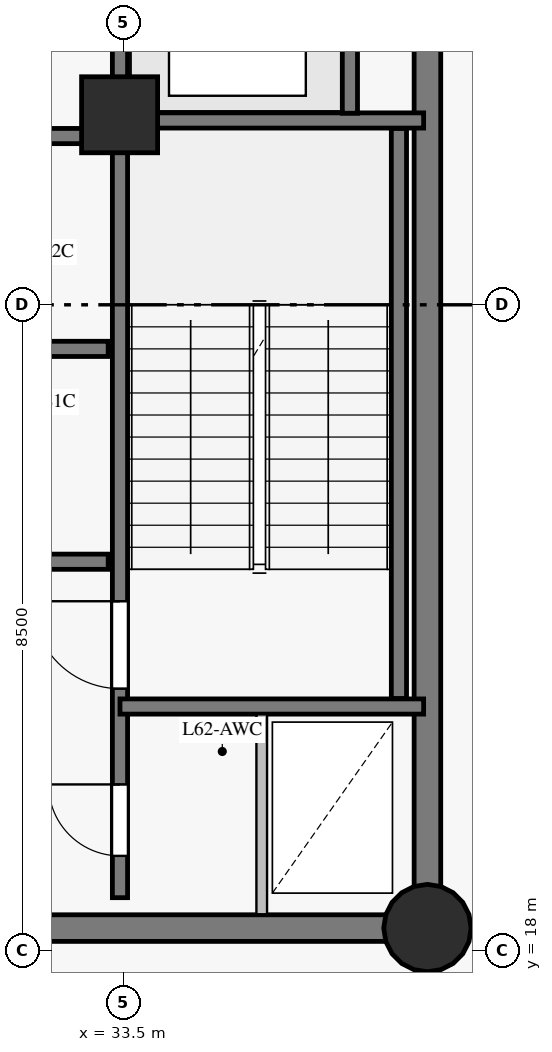
"""IFC4 building model, lengths in metres.
Left out: names, types, materials, properties, quantities, classifications, styles, units other than length and angle.
Written with IfcOpenShell. Run it as: python <this file> out.ifc"""

import sys

from ifc_helpers import new_model, si_unit, direction, frame, frame_2d, origin, origin_with_axes, origin_2d, place, context, subcontext, project, spatial, rectangle, circle, extrude, source, transform, mapped, element, fill, save


model = new_model("IFC4")
c1 = context("Model", 3, precision=1e-05, world=origin(), true_north=direction((0.0, 1.0)))
c2 = subcontext(c1, "Body", "Model", "MODEL_VIEW")
j1 = project(units=[si_unit("LENGTHUNIT", "METRE"), si_unit("PLANEANGLEUNIT", "RADIAN")], contexts=[c1])
p1 = place(None, origin())
s1 = spatial("IfcSite", under=j1, at=p1, CompositionType="ELEMENT")
p2 = place(p1, origin())
s2 = spatial("IfcBuilding", under=s1, at=p2, CompositionType="ELEMENT")
p3 = place(p2, frame((0.0, 0.0, 212.9)))
s3 = spatial("IfcBuildingStorey", under=s2, at=p3, CompositionType="ELEMENT", Elevation=212.9)
p4 = place(p3, frame((26.55, 18.3, 0.0), z_axis=(0.0, 0.0, 1.0), x_axis=(1.0, 0.0, 0.0)))
e1 = element("IfcWall", 1, at=p4, inside=s3, PredefinedType="SHEAR", context=c2, shape_type="SweptSolid", body=[
    extrude(rectangle(XDim=10.95, YDim=0.35, at=frame_2d((5.475, 0.0))), origin(), (0.0, 0.0, 1.0), 3.8),
])
p5 = place(p4, frame((4.55, 0.0, 0.0)))
e2 = element("IfcOpeningElement", 2, at=p5, cuts=e1, PredefinedType="OPENING", context=c2, shape_type="SweptSolid", body=[
    extrude(rectangle(XDim=1.4, YDim=2.2, at=frame_2d((0.7, 1.1))), frame((0.0, 0.185, 0.0), z_axis=(0.0, -1.0, 0.0), x_axis=(1.0, 0.0, 0.0)), (0.0, 0.0, 1.0), 0.37),
])
p6 = place(p3, frame((37.5, 18.3, 0.0), z_axis=(0.0, 0.0, 1.0), x_axis=(0.0, 1.0, 0.0)))
e3 = element("IfcWall", 3, at=p6, inside=s3, PredefinedType="SHEAR", context=c2, shape_type="SweptSolid", body=[
    extrude(rectangle(XDim=16.4, YDim=0.35, at=frame_2d((8.2, 0.0))), origin(), (0.0, 0.0, 1.0), 3.8),
])
p7 = place(p6, frame((13.85, 0.0, 0.0)))
e4 = element("IfcOpeningElement", 4, at=p7, cuts=e3, PredefinedType="OPENING", context=c2, shape_type="SweptSolid", body=[
    extrude(rectangle(XDim=1.2, YDim=2.15, at=frame_2d((0.6, 1.075))), frame((0.0, 0.185, 0.0), z_axis=(0.0, -1.0, 0.0), x_axis=(1.0, 0.0, 0.0)), (0.0, 0.0, 1.0), 0.37),
])
m1 = source(origin_with_axes(), c2, "Body", "SweptSolid", [
    extrude(circle(Radius=0.575, at=origin_2d()), origin(), (0.0, 0.0, 1.0), 4.0),
])
p8 = place(p3, frame((37.5, 18.3, 0.0), z_axis=(0.0, 0.0, 1.0), x_axis=(1.0, 0.0, 0.0)))
e5 = element("IfcColumn", 5, at=p8, inside=s3, PredefinedType="COLUMN", context=c2, shape_type="MappedRepresentation", body=[
    mapped(m1, transform((0.0, 0.0, 0.0), scale=1.0)),
])
m2 = source(origin_with_axes(), c2, "Body", "SweptSolid", [
    extrude(rectangle(XDim=1.0, YDim=1.0, at=origin_2d()), origin(), (0.0, 0.0, 1.0), 4.0),
])
p9 = place(p3, frame((33.45, 29.0, 0.0), z_axis=(0.0, 0.0, 1.0), x_axis=(1.0, 0.0, 0.0)))
e6 = element("IfcColumn", 6, at=p9, inside=s3, PredefinedType="COLUMN", context=c2, shape_type="MappedRepresentation", body=[
    mapped(m2, transform((0.0, 0.0, 0.0), scale=1.0)),
])
p10 = place(p3, frame((33.455, 18.7, 0.0), z_axis=(0.0, 0.0, 1.0), x_axis=(0.0, 1.0, 0.0)))
e7 = element("IfcWall", 7, at=p10, inside=s3, PredefinedType="SHEAR", context=c2, shape_type="SweptSolid", body=[
    extrude(rectangle(XDim=15.6, YDim=0.2, at=frame_2d((7.8, 0.0))), origin(), (0.0, 0.0, 1.0), 3.8),
])
p11 = place(p10, frame((2.75, 0.0, 0.0)))
e8 = element("IfcOpeningElement", 8, at=p11, cuts=e7, PredefinedType="OPENING", context=c2, shape_type="SweptSolid", body=[
    extrude(rectangle(XDim=1.15, YDim=2.15, at=frame_2d((0.575, 1.075))), frame((0.0, 0.11, 0.0), z_axis=(0.0, -1.0, 0.0), x_axis=(1.0, 0.0, 0.0)), (0.0, 0.0, 1.0), 0.22),
])
p12 = place(p10, frame((0.55, 0.0, 0.0)))
e9 = element("IfcOpeningElement", 9, at=p12, cuts=e7, PredefinedType="OPENING", context=c2, shape_type="SweptSolid", body=[
    extrude(rectangle(XDim=0.94, YDim=2.1, at=frame_2d((0.47, 1.05))), frame((0.0, 0.11, 0.0), z_axis=(0.0, -1.0, 0.0), x_axis=(1.0, 0.0, 0.0)), (0.0, 0.0, 1.0), 0.22),
])
p13 = place(p3, frame((23.7, 23.12, 0.0), z_axis=(0.0, 0.0, 1.0), x_axis=(1.0, 0.0, 0.0)))
e10 = element("IfcWall", 10, at=p13, inside=s3, PredefinedType="SHEAR", context=c2, shape_type="SweptSolid", body=[
    extrude(rectangle(XDim=9.6, YDim=0.2, at=frame_2d((4.8, 0.0))), origin(), (0.0, 0.0, 1.0), 3.8),
])
p14 = place(p13, frame((0.7, 0.0, 0.0)))
e11 = element("IfcOpeningElement", 11, at=p14, cuts=e10, PredefinedType="OPENING", context=c2, shape_type="SweptSolid", body=[
    extrude(rectangle(XDim=0.92, YDim=2.1, at=frame_2d((0.46, 1.05))), frame((0.0, 0.11, 0.0), z_axis=(0.0, -1.0, 0.0), x_axis=(1.0, 0.0, 0.0)), (0.0, 0.0, 1.0), 0.22),
])
p15 = place(p13, frame((4.2, 0.0, 0.0)))
e12 = element("IfcOpeningElement", 12, at=p15, cuts=e10, PredefinedType="OPENING", context=c2, shape_type="SweptSolid", body=[
    extrude(rectangle(XDim=0.92, YDim=2.1, at=frame_2d((0.46, 1.05))), frame((0.0, 0.11, 0.0), z_axis=(0.0, -1.0, 0.0), x_axis=(1.0, 0.0, 0.0)), (0.0, 0.0, 1.0), 0.22),
])
p16 = place(p13, frame((7.45, 0.0, 0.0)))
e13 = element("IfcOpeningElement", 13, at=p16, cuts=e10, PredefinedType="OPENING", context=c2, shape_type="SweptSolid", body=[
    extrude(rectangle(XDim=0.92, YDim=2.1, at=frame_2d((0.46, 1.05))), frame((0.0, 0.11, 0.0), z_axis=(0.0, -1.0, 0.0), x_axis=(1.0, 0.0, 0.0)), (0.0, 0.0, 1.0), 0.22),
])
p17 = place(p3, frame((23.7, 25.92, 0.0), z_axis=(0.0, 0.0, 1.0), x_axis=(1.0, 0.0, 0.0)))
e14 = element("IfcWall", 14, at=p17, inside=s3, PredefinedType="SHEAR", context=c2, shape_type="SweptSolid", body=[
    extrude(rectangle(XDim=9.6, YDim=0.2, at=frame_2d((4.8, 0.0))), origin(), (0.0, 0.0, 1.0), 3.8),
])
p18 = place(p3, frame((23.7, 28.72, 0.0), z_axis=(0.0, 0.0, 1.0), x_axis=(1.0, 0.0, 0.0)))
e15 = element("IfcWall", 15, at=p18, inside=s3, PredefinedType="SHEAR", context=c2, shape_type="SweptSolid", body=[
    extrude(rectangle(XDim=9.6, YDim=0.2, at=frame_2d((4.8, 0.0))), origin(), (0.0, 0.0, 1.0), 3.8),
])
p19 = place(p18, frame((0.7, 0.0, 0.0)))
e16 = element("IfcOpeningElement", 16, at=p19, cuts=e15, PredefinedType="OPENING", context=c2, shape_type="SweptSolid", body=[
    extrude(rectangle(XDim=0.92, YDim=2.1, at=frame_2d((0.46, 1.05))), frame((0.0, 0.11, 0.0), z_axis=(0.0, -1.0, 0.0), x_axis=(1.0, 0.0, 0.0)), (0.0, 0.0, 1.0), 0.22),
])
p20 = place(p18, frame((4.2, 0.0, 0.0)))
e17 = element("IfcOpeningElement", 17, at=p20, cuts=e15, PredefinedType="OPENING", context=c2, shape_type="SweptSolid", body=[
    extrude(rectangle(XDim=0.92, YDim=2.1, at=frame_2d((0.46, 1.05))), frame((0.0, 0.11, 0.0), z_axis=(0.0, -1.0, 0.0), x_axis=(1.0, 0.0, 0.0)), (0.0, 0.0, 1.0), 0.22),
])
p21 = place(p18, frame((7.45, 0.0, 0.0)))
e18 = element("IfcOpeningElement", 18, at=p21, cuts=e15, PredefinedType="OPENING", context=c2, shape_type="SweptSolid", body=[
    extrude(rectangle(XDim=0.92, YDim=2.1, at=frame_2d((0.46, 1.05))), frame((0.0, 0.11, 0.0), z_axis=(0.0, -1.0, 0.0), x_axis=(1.0, 0.0, 0.0)), (0.0, 0.0, 1.0), 0.22),
])
p22 = place(p3, frame((37.125, 21.32, 0.0), z_axis=(0.0, 0.0, 1.0), x_axis=(0.0, 1.0, 0.0)))
e19 = element("IfcWall", 19, at=p22, inside=s3, PredefinedType="SHEAR", context=c2, shape_type="SweptSolid", body=[
    extrude(rectangle(XDim=7.5, YDim=0.2, at=frame_2d((3.75, 0.0))), origin(), (0.0, 0.0, 1.0), 3.8),
])
for number, where, z_axis, x_axis in (
    (20, (33.455, 21.215, 0.0), (0.0, 0.0, 1.0), (1.0, 0.0, 0.0)),
    (21, (33.455, 28.925, 0.0), (0.0, 0.0, 1.0), (1.0, 0.0, 0.0)),
):
    element("IfcWall", number, at=place(p3, frame(where, z_axis=z_axis, x_axis=x_axis)), inside=s3, PredefinedType="SHEAR", context=c2, shape_type="SweptSolid", body=[
        extrude(rectangle(XDim=3.995, YDim=0.2, at=frame_2d((1.998, 0.0))), origin(), (0.0, 0.0, 1.0), 3.8),
    ])
p23 = place(p3, frame((36.48, 29.02, 0.0), z_axis=(0.0, 0.0, 1.0), x_axis=(0.0, 1.0, 0.0)))
e22 = element("IfcWall", 22, at=p23, inside=s3, PredefinedType="SHEAR", context=c2, shape_type="SweptSolid", body=[
    extrude(rectangle(XDim=2.86, YDim=0.2, at=frame_2d((1.43, 0.0))), origin(), (0.0, 0.0, 1.0), 3.8),
])
p24 = place(p3, frame((35.32, 18.482, 0.0), z_axis=(0.0, 0.0, 1.0), x_axis=(0.0, 1.0, 0.0)))
e23 = element("IfcWall", 23, at=p24, inside=s3, PredefinedType="PARTITIONING", context=c2, shape_type="SweptSolid", body=[
    extrude(rectangle(XDim=2.629, YDim=0.14, at=frame_2d((1.314, 0.0))), origin(), (0.0, 0.0, 1.0), 3.8),
])
m3 = source(origin_with_axes(), c2, "Body", "SweptSolid", [
    extrude(rectangle(XDim=1.15, YDim=2.15, at=frame_2d((0.575, 1.075))), frame((0.0, 0.025, 0.0), z_axis=(0.0, -1.0, 0.0), x_axis=(1.0, 0.0, 0.0)), (0.0, 0.0, 1.0), 0.05),
])
p25 = place(p11, origin())
e24 = element("IfcDoor", 24, at=p25, inside=s3, OperationType="SINGLE_SWING_RIGHT", PredefinedType="DOOR", context=c2, shape_type="MappedRepresentation", body=[
    mapped(m3, transform((0.0, 0.0, 0.0), scale=1.0)),
])
fill(e8, e24)
m4 = source(origin_with_axes(), c2, "Body", "SweptSolid", [
    extrude(rectangle(XDim=0.94, YDim=2.1, at=frame_2d((0.47, 1.05))), frame((0.0, 0.025, 0.0), z_axis=(0.0, -1.0, 0.0), x_axis=(1.0, 0.0, 0.0)), (0.0, 0.0, 1.0), 0.05),
])
p26 = place(p12, origin())
e25 = element("IfcDoor", 25, at=p26, inside=s3, OperationType="SINGLE_SWING_RIGHT", PredefinedType="DOOR", context=c2, shape_type="MappedRepresentation", body=[
    mapped(m4, transform((0.0, 0.0, 0.0), scale=1.0)),
])
fill(e9, e25)
save(model, sys.argv[1])
